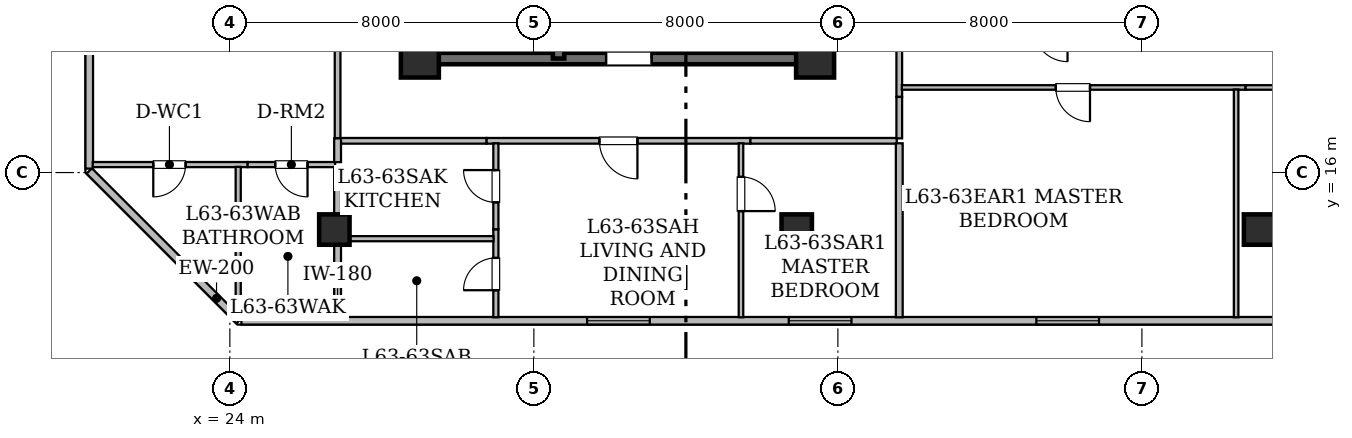
"""IFC4 building model, lengths in metres.
Left out: names, types, materials, properties, quantities, classifications, styles, units other than length and angle.
Written with IfcOpenShell. Run it as: python <this file> out.ifc"""

import sys

from ifc_helpers import new_model, si_unit, direction, frame, frame_2d, origin, origin_2d, place, context, subcontext, project, spatial, rectangle, hollow_rectangle, extrude, element, fill, save


model = new_model("IFC4")
c1 = context("Model", 3, precision=1e-05, world=origin(), true_north=direction((0.0, 1.0)))
c2 = subcontext(c1, "Body", "Model", "MODEL_VIEW")
j1 = project(units=[si_unit("LENGTHUNIT", "METRE"), si_unit("PLANEANGLEUNIT", "RADIAN")], contexts=[c1])
p1 = place(None, origin())
s1 = spatial("IfcSite", under=j1, at=p1, CompositionType="ELEMENT")
p2 = place(p1, origin())
s2 = spatial("IfcBuilding", under=s1, at=p2, CompositionType="ELEMENT")
p3 = place(p2, frame((0.0, 0.0, 246.4)))
s3 = spatial("IfcBuildingStorey", under=s2, at=p3, CompositionType="ELEMENT", Elevation=246.4)
for number, where, z_axis, x_axis in (
    (1, (29.0, 19.0, 0.0), (0.0, 0.0, 1.0), (1.0, 0.0, 0.0)),
    (2, (39.4, 19.0, 0.0), (0.0, 0.0, 1.0), (1.0, 0.0, 0.0)),
):
    element("IfcColumn", number, at=place(p3, frame(where, z_axis=z_axis, x_axis=x_axis)), inside=s3, PredefinedType="COLUMN", context=c2, shape_type="SweptSolid", body=[
        extrude(hollow_rectangle(XDim=1.0, YDim=1.0, WallThickness=0.05, at=origin_2d()), origin(), (0.0, 0.0, 1.0), 3.65),
    ])
for number, where, z_axis, x_axis in (
    (3, (26.75, 14.5, 0.0), (0.0, 0.0, 1.0), (1.0, 0.0, 0.0)),
    (4, (38.917, 14.5, 0.0), (0.0, 0.0, 1.0), (1.0, 0.0, 0.0)),
    (5, (51.083, 14.5, 0.0), (0.0, 0.0, 1.0), (1.0, 0.0, 0.0)),
):
    element("IfcColumn", number, at=place(p3, frame(where, z_axis=z_axis, x_axis=x_axis)), inside=s3, PredefinedType="COLUMN", context=c2, shape_type="SweptSolid", body=[
        extrude(hollow_rectangle(XDim=0.8, YDim=0.8, WallThickness=0.04, at=origin_2d()), origin(), (0.0, 0.0, 1.0), 3.65),
    ])
p4 = place(p3, frame((24.241, 12.1, 0.0), z_axis=(0.0, 0.0, 1.0), x_axis=(-0.707106781187, 0.707106781187, 0.0)))
e6 = element("IfcWall", 6, at=p4, inside=s3, PredefinedType="STANDARD", context=c2, shape_type="SweptSolid", body=[
    extrude(rectangle(XDim=5.573, YDim=0.2, at=frame_2d((2.787, 0.0))), origin(), (0.0, 0.0, 1.0), 3.43),
])
p5 = place(p3, frame((20.3, 16.104, 0.0), z_axis=(0.0, 0.0, 1.0), x_axis=(0.0, 1.0, 0.0)))
e7 = element("IfcWall", 7, at=p5, inside=s3, PredefinedType="STANDARD", context=c2, shape_type="SweptSolid", body=[
    extrude(rectangle(XDim=8.863, YDim=0.2, at=frame_2d((4.432, 0.0))), origin(), (0.0, 0.0, 1.0), 3.43),
])
p6 = place(p5, frame((3.606, 0.0, 0.85)))
e8 = element("IfcOpeningElement", 8, at=p6, cuts=e7, PredefinedType="OPENING", context=c2, shape_type="SweptSolid", body=[
    extrude(rectangle(XDim=1.65, YDim=1.55, at=frame_2d((0.825, 0.775))), frame((0.0, 0.11, 0.0), z_axis=(0.0, -1.0, 0.0), x_axis=(1.0, 0.0, 0.0)), (0.0, 0.0, 1.0), 0.22),
])
p7 = place(p3, frame((65.696, 12.1, 0.0), z_axis=(0.0, 0.0, 1.0), x_axis=(-1.0, 0.0, 0.0)))
e9 = element("IfcWall", 9, at=p7, inside=s3, PredefinedType="STANDARD", context=c2, shape_type="SweptSolid", body=[
    extrude(rectangle(XDim=41.393, YDim=0.2, at=frame_2d((20.697, 0.0))), origin(), (0.0, 0.0, 1.0), 3.43),
])
p8 = place(p7, frame((30.646, 0.0, 0.85)))
e10 = element("IfcOpeningElement", 10, at=p8, cuts=e9, PredefinedType="OPENING", context=c2, shape_type="SweptSolid", body=[
    extrude(rectangle(XDim=1.65, YDim=1.55, at=frame_2d((0.825, 0.775))), frame((0.0, 0.11, 0.0), z_axis=(0.0, -1.0, 0.0), x_axis=(1.0, 0.0, 0.0)), (0.0, 0.0, 1.0), 0.22),
])
p9 = place(p7, frame((25.339, 0.0, 0.85)))
e11 = element("IfcOpeningElement", 11, at=p9, cuts=e9, PredefinedType="OPENING", context=c2, shape_type="SweptSolid", body=[
    extrude(rectangle(XDim=1.65, YDim=1.55, at=frame_2d((0.825, 0.775))), frame((0.0, 0.11, 0.0), z_axis=(0.0, -1.0, 0.0), x_axis=(1.0, 0.0, 0.0)), (0.0, 0.0, 1.0), 0.22),
])
p10 = place(p7, frame((18.824, 0.0, 0.85)))
e12 = element("IfcOpeningElement", 12, at=p10, cuts=e9, PredefinedType="OPENING", context=c2, shape_type="SweptSolid", body=[
    extrude(rectangle(XDim=1.65, YDim=1.55, at=frame_2d((0.825, 0.775))), frame((0.0, 0.11, 0.0), z_axis=(0.0, -1.0, 0.0), x_axis=(1.0, 0.0, 0.0)), (0.0, 0.0, 1.0), 0.22),
])
p11 = place(p7, frame((11.789, 0.0, 0.85)))
e13 = element("IfcOpeningElement", 13, at=p11, cuts=e9, PredefinedType="OPENING", context=c2, shape_type="SweptSolid", body=[
    extrude(rectangle(XDim=1.65, YDim=1.55, at=frame_2d((0.825, 0.775))), frame((0.0, 0.11, 0.0), z_axis=(0.0, -1.0, 0.0), x_axis=(1.0, 0.0, 0.0)), (0.0, 0.0, 1.0), 0.22),
])
p12 = place(p7, frame((5.984, 0.0, 0.85)))
e14 = element("IfcOpeningElement", 14, at=p12, cuts=e9, PredefinedType="OPENING", context=c2, shape_type="SweptSolid", body=[
    extrude(rectangle(XDim=1.65, YDim=1.55, at=frame_2d((0.825, 0.775))), frame((0.0, 0.11, 0.0), z_axis=(0.0, -1.0, 0.0), x_axis=(1.0, 0.0, 0.0)), (0.0, 0.0, 1.0), 0.22),
])
p13 = place(p7, frame((1.371, 0.0, 0.85)))
e15 = element("IfcOpeningElement", 15, at=p13, cuts=e9, PredefinedType="OPENING", context=c2, shape_type="SweptSolid", body=[
    extrude(rectangle(XDim=1.65, YDim=1.55, at=frame_2d((0.825, 0.775))), frame((0.0, 0.11, 0.0), z_axis=(0.0, -1.0, 0.0), x_axis=(1.0, 0.0, 0.0)), (0.0, 0.0, 1.0), 0.22),
])
p14 = place(p3, frame((29.0, 19.0, 0.0), z_axis=(0.0, 0.0, 1.0), x_axis=(0.0, 1.0, 0.0)))
e16 = element("IfcWall", 16, at=p14, inside=s3, PredefinedType="SHEAR", context=c2, shape_type="SweptSolid", body=[
    extrude(rectangle(XDim=9.0, YDim=0.3, at=frame_2d((4.5, 0.0))), origin(), (0.0, 0.0, 1.0), 3.43),
])
p15 = place(p3, frame((29.0, 19.0, 0.0), z_axis=(0.0, 0.0, 1.0), x_axis=(1.0, 0.0, 0.0)))
e17 = element("IfcWall", 17, at=p15, inside=s3, PredefinedType="SHEAR", context=c2, shape_type="SweptSolid", body=[
    extrude(rectangle(XDim=10.4, YDim=0.3, at=frame_2d((5.2, 0.0))), origin(), (0.0, 0.0, 1.0), 3.43),
])
p16 = place(p15, frame((4.9, 0.0, 0.0)))
e18 = element("IfcOpeningElement", 18, at=p16, cuts=e17, PredefinedType="OPENING", context=c2, shape_type="SweptSolid", body=[
    extrude(rectangle(XDim=1.2, YDim=2.15, at=frame_2d((0.6, 1.075))), frame((0.0, 0.16, 0.0), z_axis=(0.0, -1.0, 0.0), x_axis=(1.0, 0.0, 0.0)), (0.0, 0.0, 1.0), 0.32),
])
p17 = place(p3, frame((39.4, 19.0, 0.0), z_axis=(0.0, 0.0, 1.0), x_axis=(0.0, 1.0, 0.0)))
e19 = element("IfcWall", 19, at=p17, inside=s3, PredefinedType="SHEAR", context=c2, shape_type="SweptSolid", body=[
    extrude(rectangle(XDim=5.4, YDim=0.3, at=frame_2d((2.7, 0.0))), origin(), (0.0, 0.0, 1.0), 3.43),
])
p18 = place(p3, frame((32.65, 19.0, 0.0), z_axis=(0.0, 0.0, 1.0), x_axis=(0.0, 1.0, 0.0)))
e20 = element("IfcWall", 20, at=p18, inside=s3, PredefinedType="SHEAR", context=c2, shape_type="SweptSolid", body=[
    extrude(rectangle(XDim=9.0, YDim=0.3, at=frame_2d((4.5, 0.0))), origin(), (0.0, 0.0, 1.0), 3.43),
])
p19 = place(p18, frame((0.72, 0.0, 0.0)))
e21 = element("IfcOpeningElement", 21, at=p19, cuts=e20, PredefinedType="OPENING", context=c2, shape_type="SweptSolid", body=[
    extrude(rectangle(XDim=1.0, YDim=2.15, at=frame_2d((0.5, 1.075))), frame((0.0, 0.16, 0.0), z_axis=(0.0, -1.0, 0.0), x_axis=(1.0, 0.0, 0.0)), (0.0, 0.0, 1.0), 0.32),
])
p20 = place(p3, frame((36.45, 19.154, 0.0), z_axis=(0.0, 0.0, 1.0), x_axis=(0.0, 1.0, 0.0)))
e22 = element("IfcWall", 22, at=p20, inside=s3, PredefinedType="SHEAR", context=c2, shape_type="SweptSolid", body=[
    extrude(rectangle(XDim=4.746, YDim=0.3, at=frame_2d((2.373, 0.0))), origin(), (0.0, 0.0, 1.0), 3.43),
])
p21 = place(p20, frame((0.696, 0.0, 0.0)))
e23 = element("IfcOpeningElement", 23, at=p21, cuts=e22, PredefinedType="OPENING", context=c2, shape_type="SweptSolid", body=[
    extrude(rectangle(XDim=1.1, YDim=2.15, at=frame_2d((0.55, 1.075))), frame((0.0, 0.16, 0.0), z_axis=(0.0, -1.0, 0.0), x_axis=(1.0, 0.0, 0.0)), (0.0, 0.0, 1.0), 0.32),
])
p22 = place(p20, frame((3.316, 0.0, 0.0)))
e24 = element("IfcOpeningElement", 24, at=p22, cuts=e22, PredefinedType="OPENING", context=c2, shape_type="SweptSolid", body=[
    extrude(rectangle(XDim=1.1, YDim=2.15, at=frame_2d((0.55, 1.075))), frame((0.0, 0.16, 0.0), z_axis=(0.0, -1.0, 0.0), x_axis=(1.0, 0.0, 0.0)), (0.0, 0.0, 1.0), 0.32),
])
p23 = place(p3, frame((26.835, 16.9, 0.0), z_axis=(0.0, 0.0, 1.0), x_axis=(0.0, 1.0, 0.0)))
e25 = element("IfcWall", 25, at=p23, inside=s3, PredefinedType="STANDARD", context=c2, shape_type="SweptSolid", body=[
    extrude(rectangle(XDim=8.159, YDim=0.15, at=frame_2d((4.08, 0.0))), origin(), (0.0, 0.0, 1.0), 2.687),
])
p24 = place(p23, frame((3.559, 0.0, 0.0)))
e26 = element("IfcOpeningElement", 26, at=p24, cuts=e25, PredefinedType="OPENING", context=c2, shape_type="SweptSolid", body=[
    extrude(rectangle(XDim=1.0, YDim=2.15, at=frame_2d((0.5, 1.075))), frame((0.0, 0.085, 0.0), z_axis=(0.0, -1.0, 0.0), x_axis=(1.0, 0.0, 0.0)), (0.0, 0.0, 1.0), 0.17),
])
p25 = place(p3, frame((37.699, 16.835, 0.0), z_axis=(0.0, 0.0, 1.0), x_axis=(-1.0, 0.0, 0.0)))
e27 = element("IfcWall", 27, at=p25, inside=s3, PredefinedType="STANDARD", context=c2, shape_type="SweptSolid", body=[
    extrude(rectangle(XDim=6.948, YDim=0.15, at=frame_2d((3.474, 0.0))), origin(), (0.0, 0.0, 1.0), 3.43),
])
p26 = place(p25, frame((2.974, 0.0, 0.0)))
e28 = element("IfcOpeningElement", 28, at=p26, cuts=e27, PredefinedType="OPENING", context=c2, shape_type="SweptSolid", body=[
    extrude(rectangle(XDim=1.0, YDim=2.15, at=frame_2d((0.5, 1.075))), frame((0.0, 0.085, 0.0), z_axis=(0.0, -1.0, 0.0), x_axis=(1.0, 0.0, 0.0)), (0.0, 0.0, 1.0), 0.17),
])
for number, where, z_axis, x_axis in (
    (29, (30.751, 16.835, 0.0), (0.0, 0.0, 1.0), (-1.0, 0.0, 0.0)),
    (30, (41.55, 16.835, 0.0), (0.0, 0.0, 1.0), (-1.0, 0.0, 0.0)),
):
    element("IfcWall", number, at=place(p3, frame(where, z_axis=z_axis, x_axis=x_axis)), inside=s3, PredefinedType="STANDARD", context=c2, shape_type="SweptSolid", body=[
        extrude(rectangle(XDim=3.851, YDim=0.15, at=frame_2d((1.926, 0.0))), origin(), (0.0, 0.0, 1.0), 2.725),
    ])
p27 = place(p3, frame((41.615, 19.57, 0.0), z_axis=(0.0, 0.0, 1.0), x_axis=(0.0, -1.0, 0.0)))
e31 = element("IfcWall", 31, at=p27, inside=s3, PredefinedType="STANDARD", context=c2, shape_type="SweptSolid", body=[
    extrude(rectangle(XDim=1.58, YDim=0.15, at=frame_2d((0.79, 0.0))), origin(), (0.0, 0.0, 1.0), 2.725),
])
p28 = place(p3, frame((41.615, 17.99, 0.0), z_axis=(0.0, 0.0, 1.0), x_axis=(0.0, -1.0, 0.0)))
e32 = element("IfcWall", 32, at=p28, inside=s3, PredefinedType="STANDARD", context=c2, shape_type="SweptSolid", body=[
    extrude(rectangle(XDim=1.09, YDim=0.15, at=frame_2d((0.545, 0.0))), origin(), (0.0, 0.0, 1.0), 2.725),
])
p29 = place(p3, frame((24.469, 16.21, 0.0), z_axis=(0.0, 0.0, 1.0), x_axis=(-1.0, 0.0, 0.0)))
e33 = element("IfcWall", 33, at=p29, inside=s3, PredefinedType="PARTITIONING", context=c2, shape_type="SweptSolid", body=[
    extrude(rectangle(XDim=4.077, YDim=0.135, at=frame_2d((2.039, 0.0))), origin(), (0.0, 0.0, 1.0), 3.43),
])
p30 = place(p29, frame((1.634, 0.0, 0.0)))
e34 = element("IfcOpeningElement", 34, at=p30, cuts=e33, PredefinedType="OPENING", context=c2, shape_type="SweptSolid", body=[
    extrude(rectangle(XDim=0.85, YDim=2.1, at=frame_2d((0.425, 1.05))), frame((0.0, 0.077, 0.0), z_axis=(0.0, -1.0, 0.0), x_axis=(1.0, 0.0, 0.0)), (0.0, 0.0, 1.0), 0.155),
])
p31 = place(p3, frame((26.77, 16.21, 0.0), z_axis=(0.0, 0.0, 1.0), x_axis=(-1.0, 0.0, 0.0)))
e35 = element("IfcWall", 35, at=p31, inside=s3, PredefinedType="PARTITIONING", context=c2, shape_type="SweptSolid", body=[
    extrude(rectangle(XDim=2.301, YDim=0.135, at=frame_2d((1.15, 0.0))), origin(), (0.0, 0.0, 1.0), 2.887),
])
p32 = place(p31, frame((0.726, 0.0, 0.0)))
e36 = element("IfcOpeningElement", 36, at=p32, cuts=e35, PredefinedType="OPENING", context=c2, shape_type="SweptSolid", body=[
    extrude(rectangle(XDim=0.85, YDim=2.1, at=frame_2d((0.425, 1.05))), frame((0.0, 0.077, 0.0), z_axis=(0.0, -1.0, 0.0), x_axis=(1.0, 0.0, 0.0)), (0.0, 0.0, 1.0), 0.155),
])
p33 = place(p3, frame((26.835, 16.9, 0.0), z_axis=(0.0, 0.0, 1.0), x_axis=(0.0, -1.0, 0.0)))
e37 = element("IfcWall", 37, at=p33, inside=s3, PredefinedType="STANDARD", context=c2, shape_type="SweptSolid", body=[
    extrude(rectangle(XDim=0.625, YDim=0.18, at=frame_2d((0.312, 0.0))), origin(), (0.0, 0.0, 1.0), 3.43),
])
p34 = place(p3, frame((24.22, 16.149, 0.0), z_axis=(0.0, 0.0, 1.0), x_axis=(0.0, -1.0, 0.0)))
e38 = element("IfcWall", 38, at=p34, inside=s3, PredefinedType="PARTITIONING", context=c2, shape_type="SweptSolid", body=[
    extrude(rectangle(XDim=3.913, YDim=0.135, at=frame_2d((1.957, 0.0))), origin(), (0.0, 0.0, 1.0), 3.43),
])
p35 = place(p3, frame((26.835, 14.509, 0.0), z_axis=(0.0, 0.0, 1.0), x_axis=(0.0, -1.0, 0.0)))
e39 = element("IfcWall", 39, at=p35, inside=s3, PredefinedType="STANDARD", context=c2, shape_type="SweptSolid", body=[
    extrude(rectangle(XDim=2.317, YDim=0.18, at=frame_2d((1.159, 0.0))), origin(), (0.0, 0.0, 1.0), 2.725),
])
p36 = place(p3, frame((26.835, 16.145, 0.0), z_axis=(0.0, 0.0, 1.0), x_axis=(0.0, -1.0, 0.0)))
e40 = element("IfcWall", 40, at=p36, inside=s3, PredefinedType="STANDARD", context=c2, shape_type="SweptSolid", body=[
    extrude(rectangle(XDim=1.636, YDim=0.18, at=frame_2d((0.818, 0.0))), origin(), (0.0, 0.0, 1.0), 2.725),
])
p37 = place(p3, frame((31.0, 12.192, 0.0), z_axis=(0.0, 0.0, 1.0), x_axis=(0.0, 1.0, 0.0)))
e41 = element("IfcWall", 41, at=p37, inside=s3, PredefinedType="PARTITIONING", context=c2, shape_type="SweptSolid", body=[
    extrude(rectangle(XDim=2.317, YDim=0.135, at=frame_2d((1.159, 0.0))), origin(), (0.0, 0.0, 1.0), 2.887),
])
p38 = place(p37, frame((0.712, 0.0, 0.0)))
e42 = element("IfcOpeningElement", 42, at=p38, cuts=e41, PredefinedType="OPENING", context=c2, shape_type="SweptSolid", body=[
    extrude(rectangle(XDim=0.85, YDim=2.1, at=frame_2d((0.425, 1.05))), frame((0.0, 0.077, 0.0), z_axis=(0.0, -1.0, 0.0), x_axis=(1.0, 0.0, 0.0)), (0.0, 0.0, 1.0), 0.155),
])
p39 = place(p3, frame((31.0, 14.509, 0.0), z_axis=(0.0, 0.0, 1.0), x_axis=(0.0, 1.0, 0.0)))
e43 = element("IfcWall", 43, at=p39, inside=s3, PredefinedType="PARTITIONING", context=c2, shape_type="SweptSolid", body=[
    extrude(rectangle(XDim=2.261, YDim=0.135, at=frame_2d((1.13, 0.0))), origin(), (0.0, 0.0, 1.0), 2.887),
])
p40 = place(p39, frame((0.706, 0.0, 0.0)))
e44 = element("IfcOpeningElement", 44, at=p40, cuts=e43, PredefinedType="OPENING", context=c2, shape_type="SweptSolid", body=[
    extrude(rectangle(XDim=0.85, YDim=2.1, at=frame_2d((0.425, 1.05))), frame((0.0, 0.077, 0.0), z_axis=(0.0, -1.0, 0.0), x_axis=(1.0, 0.0, 0.0)), (0.0, 0.0, 1.0), 0.155),
])
p41 = place(p3, frame((37.45, 16.77, 0.0), z_axis=(0.0, 0.0, 1.0), x_axis=(0.0, -1.0, 0.0)))
e45 = element("IfcWall", 45, at=p41, inside=s3, PredefinedType="PARTITIONING", context=c2, shape_type="SweptSolid", body=[
    extrude(rectangle(XDim=4.578, YDim=0.12, at=frame_2d((2.289, 0.0))), origin(), (0.0, 0.0, 1.0), 2.887),
])
p42 = place(p41, frame((0.884, 0.0, 0.0)))
e46 = element("IfcOpeningElement", 46, at=p42, cuts=e45, PredefinedType="OPENING", context=c2, shape_type="SweptSolid", body=[
    extrude(rectangle(XDim=0.9, YDim=2.1, at=frame_2d((0.45, 1.05))), frame((0.0, 0.07, 0.0), z_axis=(0.0, -1.0, 0.0), x_axis=(1.0, 0.0, 0.0)), (0.0, 0.0, 1.0), 0.14),
])
p43 = place(p3, frame((26.917, 14.26, 0.0), z_axis=(0.0, 0.0, 1.0), x_axis=(1.0, 0.0, 0.0)))
e47 = element("IfcWall", 47, at=p43, inside=s3, PredefinedType="PARTITIONING", context=c2, shape_type="SweptSolid", body=[
    extrude(rectangle(XDim=4.022, YDim=0.135, at=frame_2d((2.011, 0.0))), origin(), (0.0, 0.0, 1.0), 2.887),
])
p44 = place(p3, frame((41.615, 16.77, 0.0), z_axis=(0.0, 0.0, 1.0), x_axis=(0.0, -1.0, 0.0)))
e48 = element("IfcWall", 48, at=p44, inside=s3, PredefinedType="STANDARD", context=c2, shape_type="SweptSolid", body=[
    extrude(rectangle(XDim=4.578, YDim=0.18, at=frame_2d((2.289, 0.0))), origin(), (0.0, 0.0, 1.0), 2.887),
])
p45 = place(p3, frame((50.728, 18.239, 0.0), z_axis=(0.0, 0.0, 1.0), x_axis=(-1.0, 0.0, 0.0)))
e49 = element("IfcWall", 49, at=p45, inside=s3, PredefinedType="PARTITIONING", context=c2, shape_type="SweptSolid", body=[
    extrude(rectangle(XDim=9.046, YDim=0.12, at=frame_2d((4.523, 0.0))), origin(), (0.0, 0.0, 1.0), 2.725),
])
p46 = place(p45, frame((4.094, 0.0, 0.0)))
e50 = element("IfcOpeningElement", 50, at=p46, cuts=e49, PredefinedType="OPENING", context=c2, shape_type="SweptSolid", body=[
    extrude(rectangle(XDim=0.9, YDim=2.1, at=frame_2d((0.45, 1.05))), frame((0.0, 0.07, 0.0), z_axis=(0.0, -1.0, 0.0), x_axis=(1.0, 0.0, 0.0)), (0.0, 0.0, 1.0), 0.14),
])
p47 = place(p3, frame((55.934, 18.239, 0.0), z_axis=(0.0, 0.0, 1.0), x_axis=(-1.0, 0.0, 0.0)))
e51 = element("IfcWall", 51, at=p47, inside=s3, PredefinedType="PARTITIONING", context=c2, shape_type="SweptSolid", body=[
    extrude(rectangle(XDim=5.206, YDim=0.12, at=frame_2d((2.603, 0.0))), origin(), (0.0, 0.0, 1.0), 2.725),
])
p48 = place(p47, frame((1.221, 0.0, 0.0)))
e52 = element("IfcOpeningElement", 52, at=p48, cuts=e51, PredefinedType="OPENING", context=c2, shape_type="SweptSolid", body=[
    extrude(rectangle(XDim=0.9, YDim=2.1, at=frame_2d((0.45, 1.05))), frame((0.0, 0.07, 0.0), z_axis=(0.0, -1.0, 0.0), x_axis=(1.0, 0.0, 0.0)), (0.0, 0.0, 1.0), 0.14),
])
p49 = place(p3, frame((50.479, 18.185, 0.0), z_axis=(0.0, 0.0, 1.0), x_axis=(0.0, -1.0, 0.0)))
e53 = element("IfcWall", 53, at=p49, inside=s3, PredefinedType="PARTITIONING", context=c2, shape_type="SweptSolid", body=[
    extrude(rectangle(XDim=5.993, YDim=0.12, at=frame_2d((2.997, 0.0))), origin(), (0.0, 0.0, 1.0), 2.725),
])
p50 = place(p8, origin())
e54 = element("IfcWindow", 54, at=p50, inside=s3, PartitioningType="SINGLE_PANEL", PredefinedType="WINDOW", context=c2, shape_type="SweptSolid", body=[
    extrude(rectangle(XDim=1.65, YDim=1.55, at=frame_2d((0.825, 0.775))), frame((0.0, 0.03, 0.0), z_axis=(0.0, -1.0, 0.0), x_axis=(1.0, 0.0, 0.0)), (0.0, 0.0, 1.0), 0.06),
])
fill(e10, e54)
p51 = place(p9, origin())
e55 = element("IfcWindow", 55, at=p51, inside=s3, PartitioningType="SINGLE_PANEL", PredefinedType="WINDOW", context=c2, shape_type="SweptSolid", body=[
    extrude(rectangle(XDim=1.65, YDim=1.55, at=frame_2d((0.825, 0.775))), frame((0.0, 0.03, 0.0), z_axis=(0.0, -1.0, 0.0), x_axis=(1.0, 0.0, 0.0)), (0.0, 0.0, 1.0), 0.06),
])
fill(e11, e55)
p52 = place(p10, origin())
e56 = element("IfcWindow", 56, at=p52, inside=s3, PartitioningType="SINGLE_PANEL", PredefinedType="WINDOW", context=c2, shape_type="SweptSolid", body=[
    extrude(rectangle(XDim=1.65, YDim=1.55, at=frame_2d((0.825, 0.775))), frame((0.0, 0.03, 0.0), z_axis=(0.0, -1.0, 0.0), x_axis=(1.0, 0.0, 0.0)), (0.0, 0.0, 1.0), 0.06),
])
fill(e12, e56)
p53 = place(p16, origin())
e57 = element("IfcDoor", 57, at=p53, inside=s3, OperationType="SINGLE_SWING_RIGHT", PredefinedType="DOOR", context=c2, shape_type="SweptSolid", body=[
    extrude(rectangle(XDim=1.2, YDim=2.15, at=frame_2d((0.6, 1.075))), frame((0.0, 0.025, 0.0), z_axis=(0.0, -1.0, 0.0), x_axis=(1.0, 0.0, 0.0)), (0.0, 0.0, 1.0), 0.05),
])
fill(e18, e57)
p54 = place(p26, origin())
e58 = element("IfcDoor", 58, at=p54, inside=s3, OperationType="SINGLE_SWING_LEFT", PredefinedType="DOOR", context=c2, shape_type="SweptSolid", body=[
    extrude(rectangle(XDim=1.0, YDim=2.15, at=frame_2d((0.5, 1.075))), frame((0.0, 0.025, 0.0), z_axis=(0.0, -1.0, 0.0), x_axis=(1.0, 0.0, 0.0)), (0.0, 0.0, 1.0), 0.05),
])
fill(e28, e58)
p55 = place(p30, origin())
e59 = element("IfcDoor", 59, at=p55, inside=s3, OperationType="SINGLE_SWING_RIGHT", PredefinedType="DOOR", context=c2, shape_type="SweptSolid", body=[
    extrude(rectangle(XDim=0.85, YDim=2.1, at=frame_2d((0.425, 1.05))), frame((0.0, 0.025, 0.0), z_axis=(0.0, -1.0, 0.0), x_axis=(1.0, 0.0, 0.0)), (0.0, 0.0, 1.0), 0.05),
])
fill(e34, e59)
p56 = place(p32, origin())
e60 = element("IfcDoor", 60, at=p56, inside=s3, OperationType="SINGLE_SWING_LEFT", PredefinedType="DOOR", context=c2, shape_type="SweptSolid", body=[
    extrude(rectangle(XDim=0.85, YDim=2.1, at=frame_2d((0.425, 1.05))), frame((0.0, 0.025, 0.0), z_axis=(0.0, -1.0, 0.0), x_axis=(1.0, 0.0, 0.0)), (0.0, 0.0, 1.0), 0.05),
])
fill(e36, e60)
p57 = place(p38, origin())
e61 = element("IfcDoor", 61, at=p57, inside=s3, OperationType="SINGLE_SWING_LEFT", PredefinedType="DOOR", context=c2, shape_type="SweptSolid", body=[
    extrude(rectangle(XDim=0.85, YDim=2.1, at=frame_2d((0.425, 1.05))), frame((0.0, 0.025, 0.0), z_axis=(0.0, -1.0, 0.0), x_axis=(1.0, 0.0, 0.0)), (0.0, 0.0, 1.0), 0.05),
])
fill(e42, e61)
p58 = place(p40, origin())
e62 = element("IfcDoor", 62, at=p58, inside=s3, OperationType="SINGLE_SWING_RIGHT", PredefinedType="DOOR", context=c2, shape_type="SweptSolid", body=[
    extrude(rectangle(XDim=0.85, YDim=2.1, at=frame_2d((0.425, 1.05))), frame((0.0, 0.025, 0.0), z_axis=(0.0, -1.0, 0.0), x_axis=(1.0, 0.0, 0.0)), (0.0, 0.0, 1.0), 0.05),
])
fill(e44, e62)
p59 = place(p42, origin())
e63 = element("IfcDoor", 63, at=p59, inside=s3, OperationType="SINGLE_SWING_RIGHT", PredefinedType="DOOR", context=c2, shape_type="SweptSolid", body=[
    extrude(rectangle(XDim=0.9, YDim=2.1, at=frame_2d((0.45, 1.05))), frame((0.0, 0.025, 0.0), z_axis=(0.0, -1.0, 0.0), x_axis=(1.0, 0.0, 0.0)), (0.0, 0.0, 1.0), 0.05),
])
fill(e46, e63)
p60 = place(p46, origin())
e64 = element("IfcDoor", 64, at=p60, inside=s3, OperationType="SINGLE_SWING_LEFT", PredefinedType="DOOR", context=c2, shape_type="SweptSolid", body=[
    extrude(rectangle(XDim=0.9, YDim=2.1, at=frame_2d((0.45, 1.05))), frame((0.0, 0.025, 0.0), z_axis=(0.0, -1.0, 0.0), x_axis=(1.0, 0.0, 0.0)), (0.0, 0.0, 1.0), 0.05),
])
fill(e50, e64)
save(model, sys.argv[1])
